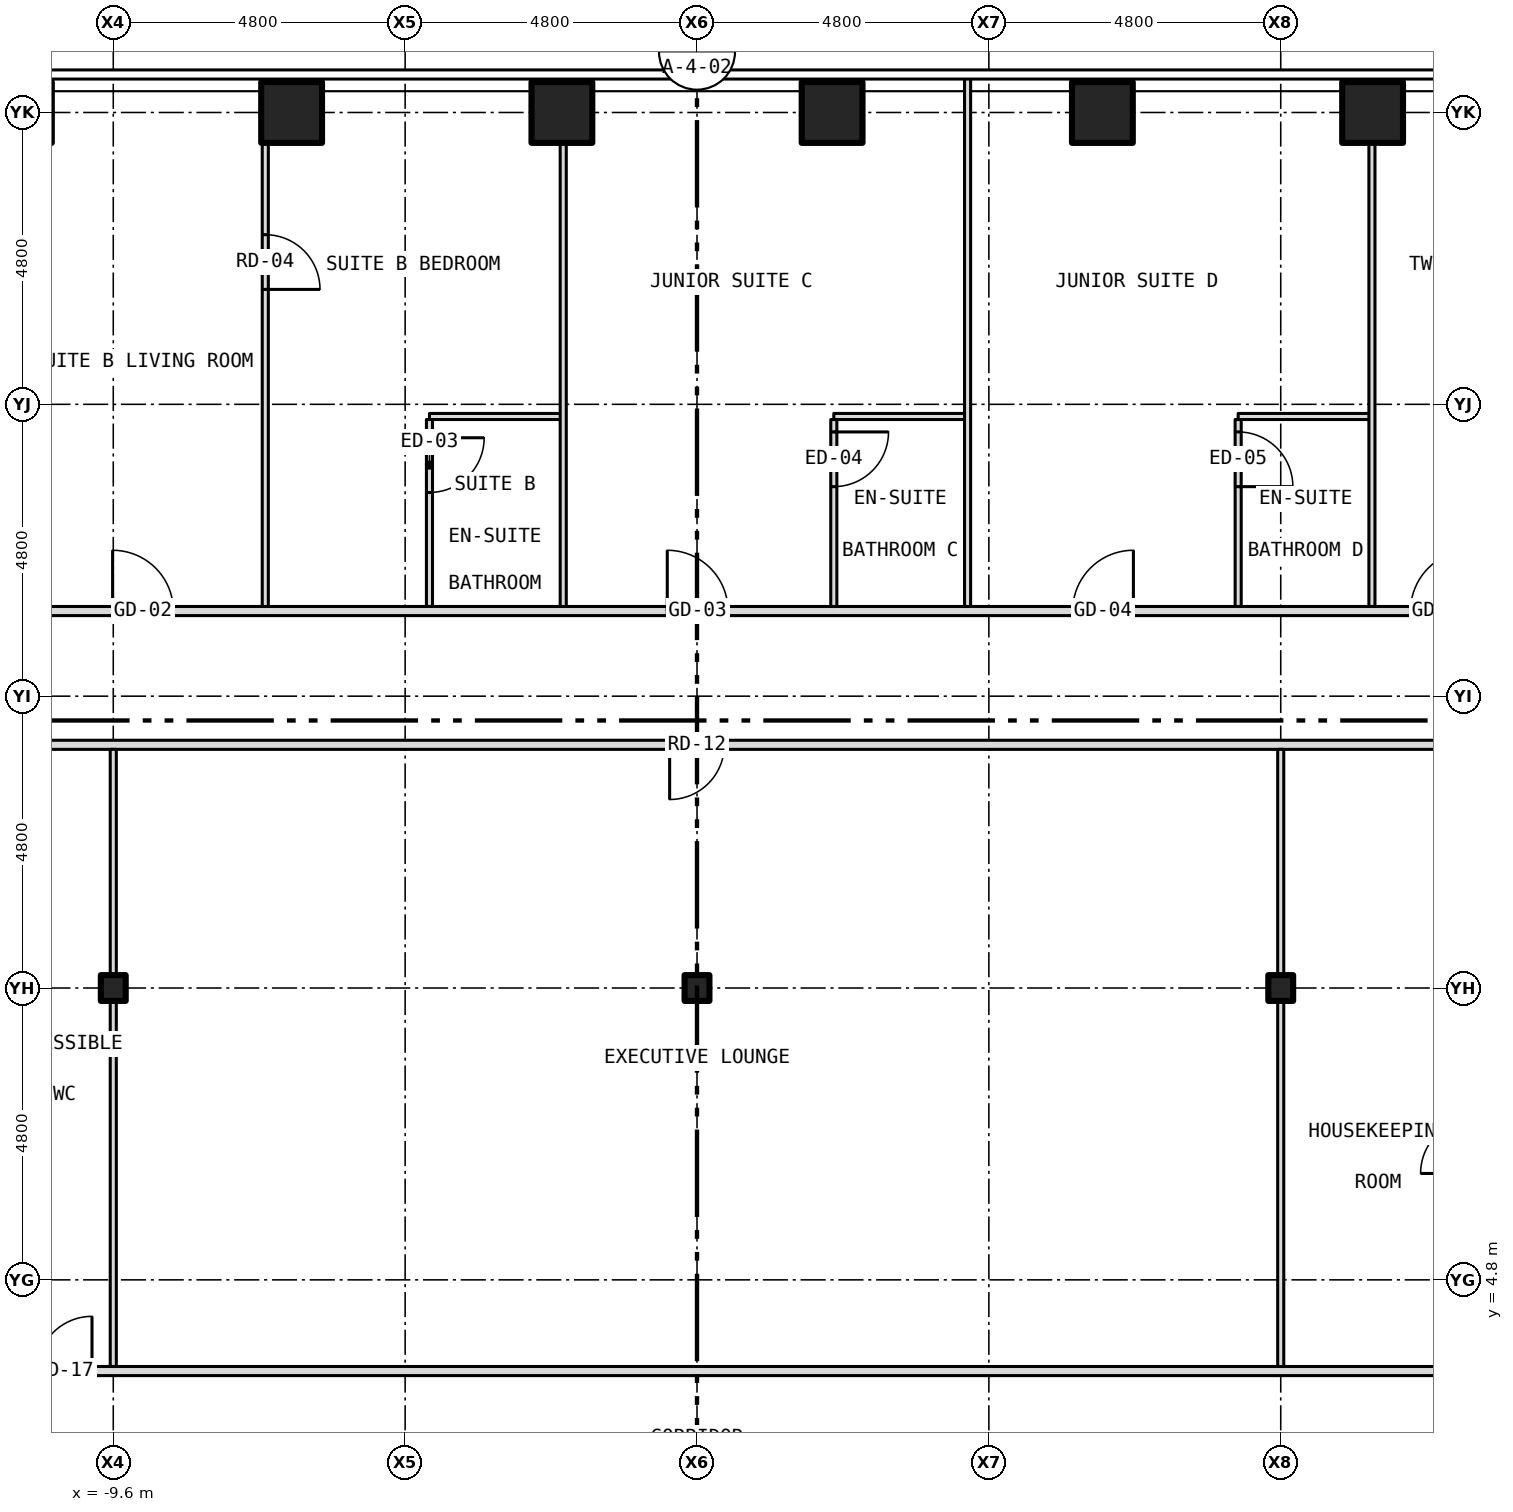
"""IFC4 building model, lengths in metres.
Left out: names, types, materials, properties, quantities, classifications, styles, units other than length and angle.
Written with IfcOpenShell. Run it as: python <this file> out.ifc"""

import sys

from ifc_helpers import new_model, si_unit, direction, frame, frame_2d, origin, origin_2d, place, context, subcontext, project, spatial, rectangle, hollow_rectangle, i_section, extrude, element, fill, save


model = new_model("IFC4")
c1 = context("Model", 3, precision=1e-05, world=origin(), true_north=direction((0.0, 1.0)))
c2 = subcontext(c1, "Body", "Model", "MODEL_VIEW")
j1 = project(units=[si_unit("LENGTHUNIT", "METRE"), si_unit("PLANEANGLEUNIT", "RADIAN")], contexts=[c1])
p1 = place(None, origin())
s1 = spatial("IfcSite", under=j1, at=p1, CompositionType="ELEMENT")
p2 = place(p1, origin())
s2 = spatial("IfcBuilding", under=s1, at=p2, CompositionType="ELEMENT")
p3 = place(p2, frame((0.0, 0.0, 39.0)))
s3 = spatial("IfcBuildingStorey", under=s2, at=p3, CompositionType="ELEMENT", Elevation=39.0)
for number, where, z_axis, x_axis in (
    (1, (-6.667, 24.0, -0.15), (0.0, 0.0, 1.0), (1.0, 0.0, 0.0)),
    (2, (-2.222, 24.0, -0.15), (0.0, 0.0, 1.0), (1.0, 0.0, 0.0)),
    (3, (2.222, 24.0, -0.15), (0.0, 0.0, 1.0), (1.0, 0.0, 0.0)),
    (4, (6.667, 24.0, -0.15), (0.0, 0.0, 1.0), (1.0, 0.0, 0.0)),
    (5, (11.111, 24.0, -0.15), (0.0, 0.0, 1.0), (1.0, 0.0, 0.0)),
):
    element("IfcColumn", number, at=place(p3, frame(where, z_axis=z_axis, x_axis=x_axis)), inside=s3, PredefinedType="COLUMN", context=c2, shape_type="SweptSolid", body=[
        extrude(hollow_rectangle(XDim=1.0, YDim=1.0, WallThickness=0.06, at=origin_2d()), origin(), (0.0, 0.0, 1.0), 3.5),
    ])
for number, where, z_axis, x_axis in (
    (6, (-9.6, 9.6, -0.15), (0.0, 0.0, 1.0), (1.0, 0.0, 0.0)),
    (7, (0.0, 9.6, -0.15), (0.0, 0.0, 1.0), (1.0, 0.0, 0.0)),
    (8, (9.6, 9.6, -0.15), (0.0, 0.0, 1.0), (1.0, 0.0, 0.0)),
):
    element("IfcColumn", number, at=place(p3, frame(where, z_axis=z_axis, x_axis=x_axis)), inside=s3, PredefinedType="COLUMN", context=c2, shape_type="SweptSolid", body=[
        extrude(i_section(OverallWidth=0.409, OverallDepth=0.424, WebThickness=0.033, FlangeThickness=0.052, at=origin_2d()), origin(), (0.0, 0.0, 1.0), 3.5),
    ])
p4 = place(p3, frame((-12.8, 3.3, 0.0), z_axis=(0.0, 0.0, 1.0), x_axis=(1.0, 0.0, 0.0)))
e9 = element("IfcWall", 9, at=p4, inside=s3, PredefinedType="PARTITIONING", context=c2, shape_type="SweptSolid", body=[
    extrude(rectangle(XDim=25.6, YDim=0.15, at=frame_2d((12.8, 0.0))), origin(), (0.0, 0.0, 1.0), 3.35),
])
p5 = place(p4, frame((1.95, 0.0, 0.0)))
e10 = element("IfcOpeningElement", 10, at=p5, cuts=e9, PredefinedType="OPENING", context=c2, shape_type="SweptSolid", body=[
    extrude(rectangle(XDim=0.9, YDim=2.1, at=frame_2d((0.45, 1.05))), frame((0.0, 0.087, 0.0), z_axis=(0.0, -1.0, 0.0), x_axis=(1.0, 0.0, 0.0)), (0.0, 0.0, 1.0), 0.174),
])
p6 = place(p3, frame((-12.8, 13.6, 0.0), z_axis=(0.0, 0.0, 1.0), x_axis=(1.0, 0.0, 0.0)))
e11 = element("IfcWall", 11, at=p6, inside=s3, PredefinedType="PARTITIONING", context=c2, shape_type="SweptSolid", body=[
    extrude(rectangle(XDim=25.6, YDim=0.15, at=frame_2d((12.8, 0.0))), origin(), (0.0, 0.0, 1.0), 3.35),
])
p7 = place(p6, frame((12.35, 0.0, 0.0)))
e12 = element("IfcOpeningElement", 12, at=p7, cuts=e11, PredefinedType="OPENING", context=c2, shape_type="SweptSolid", body=[
    extrude(rectangle(XDim=0.9, YDim=2.1, at=frame_2d((0.45, 1.05))), frame((0.0, 0.087, 0.0), z_axis=(0.0, -1.0, 0.0), x_axis=(1.0, 0.0, 0.0)), (0.0, 0.0, 1.0), 0.174),
])
p8 = place(p3, frame((-15.8, 15.8, 0.0), z_axis=(0.0, 0.0, 1.0), x_axis=(1.0, 0.0, 0.0)))
e13 = element("IfcWall", 13, at=p8, inside=s3, PredefinedType="PARTITIONING", context=c2, shape_type="SweptSolid", body=[
    extrude(rectangle(XDim=31.6, YDim=0.15, at=frame_2d((15.8, 0.0))), origin(), (0.0, 0.0, 1.0), 3.35),
])
p9 = place(p8, frame((3.067, 0.0, 0.0)))
e14 = element("IfcOpeningElement", 14, at=p9, cuts=e13, PredefinedType="OPENING", context=c2, shape_type="SweptSolid", body=[
    extrude(rectangle(XDim=1.0, YDim=2.1, at=frame_2d((0.5, 1.05))), frame((0.0, 0.087, 0.0), z_axis=(0.0, -1.0, 0.0), x_axis=(1.0, 0.0, 0.0)), (0.0, 0.0, 1.0), 0.174),
])
p10 = place(p8, frame((6.189, 0.0, 0.0)))
e15 = element("IfcOpeningElement", 15, at=p10, cuts=e13, PredefinedType="OPENING", context=c2, shape_type="SweptSolid", body=[
    extrude(rectangle(XDim=1.0, YDim=2.1, at=frame_2d((0.5, 1.05))), frame((0.0, 0.087, 0.0), z_axis=(0.0, -1.0, 0.0), x_axis=(1.0, 0.0, 0.0)), (0.0, 0.0, 1.0), 0.174),
])
p11 = place(p8, frame((15.311, 0.0, 0.0)))
e16 = element("IfcOpeningElement", 16, at=p11, cuts=e13, PredefinedType="OPENING", context=c2, shape_type="SweptSolid", body=[
    extrude(rectangle(XDim=1.0, YDim=2.1, at=frame_2d((0.5, 1.05))), frame((0.0, 0.087, 0.0), z_axis=(0.0, -1.0, 0.0), x_axis=(1.0, 0.0, 0.0)), (0.0, 0.0, 1.0), 0.174),
])
p12 = place(p8, frame((21.977, 0.0, 0.0)))
e17 = element("IfcOpeningElement", 17, at=p12, cuts=e13, PredefinedType="OPENING", context=c2, shape_type="SweptSolid", body=[
    extrude(rectangle(XDim=1.0, YDim=2.1, at=frame_2d((0.5, 1.05))), frame((0.0, 0.087, 0.0), z_axis=(0.0, -1.0, 0.0), x_axis=(1.0, 0.0, 0.0)), (0.0, 0.0, 1.0), 0.174),
])
p13 = place(p8, frame((27.534, 0.0, 0.0)))
e18 = element("IfcOpeningElement", 18, at=p13, cuts=e13, PredefinedType="OPENING", context=c2, shape_type="SweptSolid", body=[
    extrude(rectangle(XDim=1.0, YDim=2.1, at=frame_2d((0.5, 1.05))), frame((0.0, 0.087, 0.0), z_axis=(0.0, -1.0, 0.0), x_axis=(1.0, 0.0, 0.0)), (0.0, 0.0, 1.0), 0.174),
])
for number, where, z_axis, x_axis in (
    (19, (-4.4, 19.0, 0.0), (0.0, 0.0, 1.0), (1.0, 0.0, 0.0)),
    (20, (2.25, 19.0, 0.0), (0.0, 0.0, 1.0), (1.0, 0.0, 0.0)),
):
    element("IfcWall", number, at=place(p3, frame(where, z_axis=z_axis, x_axis=x_axis)), inside=s3, PredefinedType="PARTITIONING", context=c2, shape_type="SweptSolid", body=[
        extrude(rectangle(XDim=2.2, YDim=0.1, at=frame_2d((1.1, 0.0))), origin(), (0.0, 0.0, 1.0), 3.35),
    ])
p14 = place(p3, frame((8.9, 19.0, 0.0), z_axis=(0.0, 0.0, 1.0), x_axis=(1.0, 0.0, 0.0)))
e21 = element("IfcWall", 21, at=p14, inside=s3, PredefinedType="PARTITIONING", context=c2, shape_type="SweptSolid", body=[
    extrude(rectangle(XDim=2.2, YDim=0.1, at=frame_2d((1.1, 0.0))), origin(), (0.0, 0.0, 1.0), 3.35),
])
p15 = place(p3, frame((-9.6, 3.375, 0.0), z_axis=(0.0, 0.0, 1.0), x_axis=(0.0, 1.0, 0.0)))
e22 = element("IfcWall", 22, at=p15, inside=s3, PredefinedType="PARTITIONING", context=c2, shape_type="SweptSolid", body=[
    extrude(rectangle(XDim=6.021, YDim=0.1, at=frame_2d((3.01, 0.0))), origin(), (0.0, 0.0, 1.0), 2.728),
])
p16 = place(p3, frame((-9.6, 9.396, 0.0), z_axis=(0.0, 0.0, 1.0), x_axis=(0.0, 1.0, 0.0)))
e23 = element("IfcWall", 23, at=p16, inside=s3, PredefinedType="PARTITIONING", context=c2, shape_type="SweptSolid", body=[
    extrude(rectangle(XDim=0.408, YDim=0.1, at=frame_2d((0.204, 0.0))), origin(), (0.0, 0.0, 1.0), 3.35),
])
p17 = place(p3, frame((-9.6, 9.804, 0.0), z_axis=(0.0, 0.0, 1.0), x_axis=(0.0, 1.0, 0.0)))
e24 = element("IfcWall", 24, at=p17, inside=s3, PredefinedType="PARTITIONING", context=c2, shape_type="SweptSolid", body=[
    extrude(rectangle(XDim=3.721, YDim=0.1, at=frame_2d((1.86, 0.0))), origin(), (0.0, 0.0, 1.0), 2.728),
])
p18 = place(p3, frame((-7.1, 15.875, 0.0), z_axis=(0.0, 0.0, 1.0), x_axis=(0.0, 1.0, 0.0)))
e25 = element("IfcWall", 25, at=p18, inside=s3, PredefinedType="PARTITIONING", context=c2, shape_type="SweptSolid", body=[
    extrude(rectangle(XDim=8.005, YDim=0.1, at=frame_2d((4.002, 0.0))), origin(), (0.0, 0.0, 1.0), 3.35),
])
p19 = place(p18, frame((5.215, 0.0, 0.0)))
e26 = element("IfcOpeningElement", 26, at=p19, cuts=e25, PredefinedType="OPENING", context=c2, shape_type="SweptSolid", body=[
    extrude(rectangle(XDim=0.9, YDim=2.1, at=frame_2d((0.45, 1.05))), frame((0.0, 0.062, 0.0), z_axis=(0.0, -1.0, 0.0), x_axis=(1.0, 0.0, 0.0)), (0.0, 0.0, 1.0), 0.124),
])
p20 = place(p3, frame((-4.4, 15.875, 0.0), z_axis=(0.0, 0.0, 1.0), x_axis=(0.0, 1.0, 0.0)))
e27 = element("IfcWall", 27, at=p20, inside=s3, PredefinedType="PARTITIONING", context=c2, shape_type="SweptSolid", body=[
    extrude(rectangle(XDim=3.075, YDim=0.1, at=frame_2d((1.538, 0.0))), origin(), (0.0, 0.0, 1.0), 3.35),
])
p21 = place(p20, frame((1.875, 0.0, 0.0)))
e28 = element("IfcOpeningElement", 28, at=p21, cuts=e27, PredefinedType="OPENING", context=c2, shape_type="SweptSolid", body=[
    extrude(rectangle(XDim=0.9, YDim=2.1, at=frame_2d((0.45, 1.05))), frame((0.0, 0.062, 0.0), z_axis=(0.0, -1.0, 0.0), x_axis=(1.0, 0.0, 0.0)), (0.0, 0.0, 1.0), 0.124),
])
p22 = place(p3, frame((-2.2, 15.875, 0.0), z_axis=(0.0, 0.0, 1.0), x_axis=(0.0, 1.0, 0.0)))
e29 = element("IfcWall", 29, at=p22, inside=s3, PredefinedType="PARTITIONING", context=c2, shape_type="SweptSolid", body=[
    extrude(rectangle(XDim=8.005, YDim=0.1, at=frame_2d((4.002, 0.0))), origin(), (0.0, 0.0, 1.0), 3.35),
])
p23 = place(p3, frame((2.25, 15.875, 0.0), z_axis=(0.0, 0.0, 1.0), x_axis=(0.0, 1.0, 0.0)))
e30 = element("IfcWall", 30, at=p23, inside=s3, PredefinedType="PARTITIONING", context=c2, shape_type="SweptSolid", body=[
    extrude(rectangle(XDim=3.075, YDim=0.1, at=frame_2d((1.538, 0.0))), origin(), (0.0, 0.0, 1.0), 3.35),
])
p24 = place(p23, frame((1.971, 0.0, 0.0)))
e31 = element("IfcOpeningElement", 31, at=p24, cuts=e30, PredefinedType="OPENING", context=c2, shape_type="SweptSolid", body=[
    extrude(rectangle(XDim=0.9, YDim=2.1, at=frame_2d((0.45, 1.05))), frame((0.0, 0.062, 0.0), z_axis=(0.0, -1.0, 0.0), x_axis=(1.0, 0.0, 0.0)), (0.0, 0.0, 1.0), 0.124),
])
p25 = place(p3, frame((4.45, 15.875, 0.0), z_axis=(0.0, 0.0, 1.0), x_axis=(0.0, 1.0, 0.0)))
e32 = element("IfcWall", 32, at=p25, inside=s3, PredefinedType="PARTITIONING", context=c2, shape_type="SweptSolid", body=[
    extrude(rectangle(XDim=8.705, YDim=0.1, at=frame_2d((4.353, 0.0))), origin(), (0.0, 0.0, 1.0), 3.35),
])
p26 = place(p3, frame((8.9, 15.875, 0.0), z_axis=(0.0, 0.0, 1.0), x_axis=(0.0, 1.0, 0.0)))
e33 = element("IfcWall", 33, at=p26, inside=s3, PredefinedType="PARTITIONING", context=c2, shape_type="SweptSolid", body=[
    extrude(rectangle(XDim=3.075, YDim=0.1, at=frame_2d((1.538, 0.0))), origin(), (0.0, 0.0, 1.0), 3.35),
])
p27 = place(p26, frame((1.971, 0.0, 0.0)))
e34 = element("IfcOpeningElement", 34, at=p27, cuts=e33, PredefinedType="OPENING", context=c2, shape_type="SweptSolid", body=[
    extrude(rectangle(XDim=0.9, YDim=2.1, at=frame_2d((0.45, 1.05))), frame((0.0, 0.062, 0.0), z_axis=(0.0, -1.0, 0.0), x_axis=(1.0, 0.0, 0.0)), (0.0, 0.0, 1.0), 0.124),
])
p28 = place(p3, frame((9.6, 3.375, 0.0), z_axis=(0.0, 0.0, 1.0), x_axis=(0.0, 1.0, 0.0)))
e35 = element("IfcWall", 35, at=p28, inside=s3, PredefinedType="PARTITIONING", context=c2, shape_type="SweptSolid", body=[
    extrude(rectangle(XDim=6.021, YDim=0.1, at=frame_2d((3.01, 0.0))), origin(), (0.0, 0.0, 1.0), 2.728),
])
p29 = place(p3, frame((9.6, 9.396, 0.0), z_axis=(0.0, 0.0, 1.0), x_axis=(0.0, 1.0, 0.0)))
e36 = element("IfcWall", 36, at=p29, inside=s3, PredefinedType="PARTITIONING", context=c2, shape_type="SweptSolid", body=[
    extrude(rectangle(XDim=0.408, YDim=0.1, at=frame_2d((0.204, 0.0))), origin(), (0.0, 0.0, 1.0), 3.35),
])
p30 = place(p3, frame((9.6, 9.804, 0.0), z_axis=(0.0, 0.0, 1.0), x_axis=(0.0, 1.0, 0.0)))
e37 = element("IfcWall", 37, at=p30, inside=s3, PredefinedType="PARTITIONING", context=c2, shape_type="SweptSolid", body=[
    extrude(rectangle(XDim=3.721, YDim=0.1, at=frame_2d((1.86, 0.0))), origin(), (0.0, 0.0, 1.0), 2.728),
])
p31 = place(p3, frame((11.1, 15.875, 0.0), z_axis=(0.0, 0.0, 1.0), x_axis=(0.0, 1.0, 0.0)))
e38 = element("IfcWall", 38, at=p31, inside=s3, PredefinedType="PARTITIONING", context=c2, shape_type="SweptSolid", body=[
    extrude(rectangle(XDim=8.005, YDim=0.1, at=frame_2d((4.002, 0.0))), origin(), (0.0, 0.0, 1.0), 3.35),
])
p32 = place(p10, origin())
e39 = element("IfcDoor", 39, at=p32, inside=s3, OperationType="SINGLE_SWING_LEFT", PredefinedType="DOOR", context=c2, shape_type="SweptSolid", body=[
    extrude(rectangle(XDim=1.0, YDim=2.1, at=frame_2d((0.5, 1.05))), frame((0.0, 0.025, 0.0), z_axis=(0.0, -1.0, 0.0), x_axis=(1.0, 0.0, 0.0)), (0.0, 0.0, 1.0), 0.05),
])
fill(e15, e39)
p33 = place(p19, origin())
e40 = element("IfcDoor", 40, at=p33, inside=s3, OperationType="SINGLE_SWING_LEFT", PredefinedType="DOOR", context=c2, shape_type="SweptSolid", body=[
    extrude(rectangle(XDim=0.9, YDim=2.1, at=frame_2d((0.45, 1.05))), frame((0.0, 0.025, 0.0), z_axis=(0.0, -1.0, 0.0), x_axis=(1.0, 0.0, 0.0)), (0.0, 0.0, 1.0), 0.05),
])
fill(e26, e40)
p34 = place(p21, origin())
e41 = element("IfcDoor", 41, at=p34, inside=s3, OperationType="SINGLE_SWING_RIGHT", PredefinedType="DOOR", context=c2, shape_type="SweptSolid", body=[
    extrude(rectangle(XDim=0.9, YDim=2.1, at=frame_2d((0.45, 1.05))), frame((0.0, 0.025, 0.0), z_axis=(0.0, -1.0, 0.0), x_axis=(1.0, 0.0, 0.0)), (0.0, 0.0, 1.0), 0.05),
])
fill(e28, e41)
p35 = place(p11, origin())
e42 = element("IfcDoor", 42, at=p35, inside=s3, OperationType="SINGLE_SWING_LEFT", PredefinedType="DOOR", context=c2, shape_type="SweptSolid", body=[
    extrude(rectangle(XDim=1.0, YDim=2.1, at=frame_2d((0.5, 1.05))), frame((0.0, 0.025, 0.0), z_axis=(0.0, -1.0, 0.0), x_axis=(1.0, 0.0, 0.0)), (0.0, 0.0, 1.0), 0.05),
])
fill(e16, e42)
p36 = place(p24, origin())
e43 = element("IfcDoor", 43, at=p36, inside=s3, OperationType="SINGLE_SWING_RIGHT", PredefinedType="DOOR", context=c2, shape_type="SweptSolid", body=[
    extrude(rectangle(XDim=0.9, YDim=2.1, at=frame_2d((0.45, 1.05))), frame((0.0, 0.025, 0.0), z_axis=(0.0, -1.0, 0.0), x_axis=(1.0, 0.0, 0.0)), (0.0, 0.0, 1.0), 0.05),
])
fill(e31, e43)
p37 = place(p12, origin())
e44 = element("IfcDoor", 44, at=p37, inside=s3, OperationType="SINGLE_SWING_RIGHT", PredefinedType="DOOR", context=c2, shape_type="SweptSolid", body=[
    extrude(rectangle(XDim=1.0, YDim=2.1, at=frame_2d((0.5, 1.05))), frame((0.0, 0.025, 0.0), z_axis=(0.0, -1.0, 0.0), x_axis=(1.0, 0.0, 0.0)), (0.0, 0.0, 1.0), 0.05),
])
fill(e17, e44)
p38 = place(p27, origin())
e45 = element("IfcDoor", 45, at=p38, inside=s3, OperationType="SINGLE_SWING_LEFT", PredefinedType="DOOR", context=c2, shape_type="SweptSolid", body=[
    extrude(rectangle(XDim=0.9, YDim=2.1, at=frame_2d((0.45, 1.05))), frame((0.0, 0.025, 0.0), z_axis=(0.0, -1.0, 0.0), x_axis=(1.0, 0.0, 0.0)), (0.0, 0.0, 1.0), 0.05),
])
fill(e34, e45)
p39 = place(p13, origin())
e46 = element("IfcDoor", 46, at=p39, inside=s3, OperationType="SINGLE_SWING_RIGHT", PredefinedType="DOOR", context=c2, shape_type="SweptSolid", body=[
    extrude(rectangle(XDim=1.0, YDim=2.1, at=frame_2d((0.5, 1.05))), frame((0.0, 0.025, 0.0), z_axis=(0.0, -1.0, 0.0), x_axis=(1.0, 0.0, 0.0)), (0.0, 0.0, 1.0), 0.05),
])
fill(e18, e46)
p40 = place(p5, origin())
e47 = element("IfcDoor", 47, at=p40, inside=s3, OperationType="SINGLE_SWING_RIGHT", PredefinedType="DOOR", context=c2, shape_type="SweptSolid", body=[
    extrude(rectangle(XDim=0.9, YDim=2.1, at=frame_2d((0.45, 1.05))), frame((0.0, 0.025, 0.0), z_axis=(0.0, -1.0, 0.0), x_axis=(1.0, 0.0, 0.0)), (0.0, 0.0, 1.0), 0.05),
])
fill(e10, e47)
p41 = place(p7, origin())
e48 = element("IfcDoor", 48, at=p41, inside=s3, OperationType="SINGLE_SWING_LEFT", PredefinedType="DOOR", context=c2, shape_type="SweptSolid", body=[
    extrude(rectangle(XDim=0.9, YDim=2.1, at=frame_2d((0.45, 1.05))), frame((0.0, 0.025, 0.0), z_axis=(0.0, -1.0, 0.0), x_axis=(1.0, 0.0, 0.0)), (0.0, 0.0, 1.0), 0.05),
])
fill(e12, e48)
save(model, sys.argv[1])
